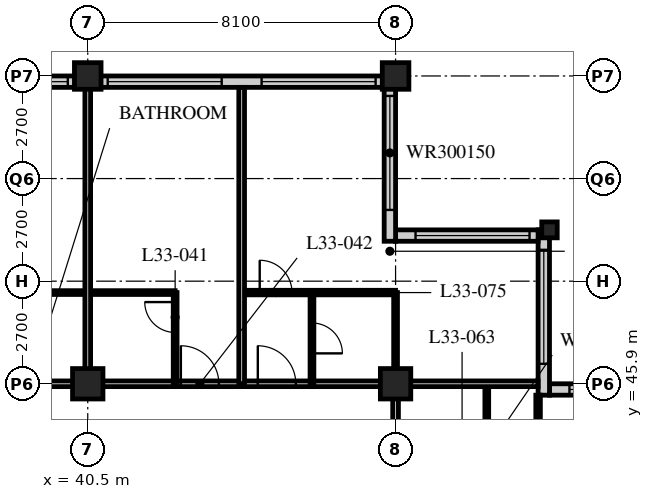
"""IFC4 building model, lengths in metres.
Left out: names, types, materials, properties, quantities, classifications, styles, units other than length and angle.
Written with IfcOpenShell. Run it as: python <this file> out.ifc"""

import sys

from ifc_helpers import new_model, si_unit, direction, frame, frame_2d, origin, origin_2d, place, context, subcontext, project, spatial, rectangle, hollow_rectangle, i_section, extrude, element, fill, save


model = new_model("IFC4")
c1 = context("Model", 3, precision=1e-05, world=origin(), true_north=direction((0.0, 1.0)))
c2 = subcontext(c1, "Body", "Model", "MODEL_VIEW")
j1 = project(units=[si_unit("LENGTHUNIT", "METRE"), si_unit("PLANEANGLEUNIT", "RADIAN")], contexts=[c1])
p1 = place(None, origin())
s1 = spatial("IfcSite", under=j1, at=p1, CompositionType="ELEMENT")
p2 = place(p1, origin())
s2 = spatial("IfcBuilding", under=s1, at=p2, CompositionType="ELEMENT")
p3 = place(p2, frame((0.0, 0.0, 130.6)))
s3 = spatial("IfcBuildingStorey", under=s2, at=p3, CompositionType="ELEMENT", Elevation=130.6)
p4 = place(p3, frame((40.5, 45.9, 0.0), z_axis=(0.0, 0.0, 1.0), x_axis=(1.0, 0.0, 0.0)))
e1 = element("IfcColumn", 1, at=p4, inside=s3, PredefinedType="COLUMN", context=c2, shape_type="SweptSolid", body=[
    extrude(hollow_rectangle(XDim=0.8, YDim=0.8, WallThickness=0.08, at=origin_2d()), origin(), (0.0, 0.0, 1.0), 3.4),
])
p5 = place(p3, frame((40.5, 54.0, 0.0), z_axis=(0.0, 0.0, 1.0), x_axis=(1.0, 0.0, 0.0)))
e2 = element("IfcColumn", 2, at=p5, inside=s3, PredefinedType="COLUMN", context=c2, shape_type="SweptSolid", body=[
    extrude(hollow_rectangle(XDim=0.7, YDim=0.7, WallThickness=0.07, at=origin_2d()), origin(), (0.0, 0.0, 1.0), 3.4),
])
p6 = place(p3, frame((48.6, 45.9, 0.0), z_axis=(0.0, 0.0, 1.0), x_axis=(1.0, 0.0, 0.0)))
e3 = element("IfcColumn", 3, at=p6, inside=s3, PredefinedType="COLUMN", context=c2, shape_type="SweptSolid", body=[
    extrude(hollow_rectangle(XDim=0.8, YDim=0.8, WallThickness=0.08, at=origin_2d()), origin(), (0.0, 0.0, 1.0), 3.4),
])
p7 = place(p3, frame((48.6, 54.0, 0.0), z_axis=(0.0, 0.0, 1.0), x_axis=(1.0, 0.0, 0.0)))
e4 = element("IfcColumn", 4, at=p7, inside=s3, PredefinedType="COLUMN", context=c2, shape_type="SweptSolid", body=[
    extrude(hollow_rectangle(XDim=0.7, YDim=0.7, WallThickness=0.07, at=origin_2d()), origin(), (0.0, 0.0, 1.0), 3.4),
])
p8 = place(p3, frame((52.65, 49.95, 0.0), z_axis=(0.0, 0.0, 1.0), x_axis=(1.0, 0.0, 0.0)))
e5 = element("IfcColumn", 5, at=p8, inside=s3, PredefinedType="COLUMN", context=c2, shape_type="SweptSolid", body=[
    extrude(i_section(OverallWidth=0.407, OverallDepth=0.419, WebThickness=0.031, FlangeThickness=0.049, FilletRadius=0.015, at=origin_2d()), origin(), (0.0, 0.0, 1.0), 3.4),
])
p9 = place(p3, frame((56.4, 45.75, 0.0), z_axis=(0.0, 0.0, 1.0), x_axis=(-1.0, 0.0, 0.0)))
e6 = element("IfcWall", 6, at=p9, inside=s3, PredefinedType="SOLIDWALL", context=c2, shape_type="SweptSolid", body=[
    extrude(rectangle(XDim=3.75, YDim=0.3, at=frame_2d((1.875, 0.0))), origin(), (0.0, 0.0, 1.0), 3.19),
])
p10 = place(p9, frame((0.225, 0.0, 0.9)))
e7 = element("IfcOpeningElement", 7, at=p10, cuts=e6, PredefinedType="OPENING", context=c2, shape_type="SweptSolid", body=[
    extrude(rectangle(XDim=3.0, YDim=1.5, at=frame_2d((1.5, 0.75))), frame((0.0, 0.16, 0.0), z_axis=(0.0, -1.0, 0.0), x_axis=(1.0, 0.0, 0.0)), (0.0, 0.0, 1.0), 0.32),
])
p11 = place(p3, frame((52.5, 45.6, 0.0), z_axis=(0.0, 0.0, 1.0), x_axis=(0.0, 1.0, 0.0)))
e8 = element("IfcWall", 8, at=p11, inside=s3, PredefinedType="SOLIDWALL", context=c2, shape_type="SweptSolid", body=[
    extrude(rectangle(XDim=4.35, YDim=0.3, at=frame_2d((2.175, 0.0))), origin(), (0.0, 0.0, 1.0), 3.19),
])
p12 = place(p11, frame((0.825, 0.0, 0.9)))
e9 = element("IfcOpeningElement", 9, at=p12, cuts=e8, PredefinedType="OPENING", context=c2, shape_type="SweptSolid", body=[
    extrude(rectangle(XDim=3.0, YDim=1.5, at=frame_2d((1.5, 0.75))), frame((0.0, 0.16, 0.0), z_axis=(0.0, -1.0, 0.0), x_axis=(1.0, 0.0, 0.0)), (0.0, 0.0, 1.0), 0.32),
])
p13 = place(p3, frame((52.35, 49.8, 0.0), z_axis=(0.0, 0.0, 1.0), x_axis=(-1.0, 0.0, 0.0)))
e10 = element("IfcWall", 10, at=p13, inside=s3, PredefinedType="SOLIDWALL", context=c2, shape_type="SweptSolid", body=[
    extrude(rectangle(XDim=3.75, YDim=0.3, at=frame_2d((1.875, 0.0))), origin(), (0.0, 0.0, 1.0), 3.19),
])
p14 = place(p13, frame((0.225, 0.0, 0.9)))
e11 = element("IfcOpeningElement", 11, at=p14, cuts=e10, PredefinedType="OPENING", context=c2, shape_type="SweptSolid", body=[
    extrude(rectangle(XDim=3.0, YDim=1.5, at=frame_2d((1.5, 0.75))), frame((0.0, 0.16, 0.0), z_axis=(0.0, -1.0, 0.0), x_axis=(1.0, 0.0, 0.0)), (0.0, 0.0, 1.0), 0.32),
])
p15 = place(p3, frame((48.45, 49.65, 0.0), z_axis=(0.0, 0.0, 1.0), x_axis=(0.0, 1.0, 0.0)))
e12 = element("IfcWall", 12, at=p15, inside=s3, PredefinedType="SOLIDWALL", context=c2, shape_type="SweptSolid", body=[
    extrude(rectangle(XDim=4.35, YDim=0.3, at=frame_2d((2.175, 0.0))), origin(), (0.0, 0.0, 1.0), 3.19),
])
p16 = place(p15, frame((0.825, 0.0, 0.9)))
e13 = element("IfcOpeningElement", 13, at=p16, cuts=e12, PredefinedType="OPENING", context=c2, shape_type="SweptSolid", body=[
    extrude(rectangle(XDim=3.0, YDim=1.5, at=frame_2d((1.5, 0.75))), frame((0.0, 0.16, 0.0), z_axis=(0.0, -1.0, 0.0), x_axis=(1.0, 0.0, 0.0)), (0.0, 0.0, 1.0), 0.32),
])
p17 = place(p3, frame((48.3, 53.85, 0.0), z_axis=(0.0, 0.0, 1.0), x_axis=(-1.0, 0.0, 0.0)))
e14 = element("IfcWall", 14, at=p17, inside=s3, PredefinedType="SOLIDWALL", context=c2, shape_type="SweptSolid", body=[
    extrude(rectangle(XDim=40.2, YDim=0.3, at=frame_2d((20.1, 0.0))), origin(), (0.0, 0.0, 1.0), 3.19),
])
p18 = place(p17, frame((0.225, 0.0, 0.9)))
e15 = element("IfcOpeningElement", 15, at=p18, cuts=e14, PredefinedType="OPENING", context=c2, shape_type="SweptSolid", body=[
    extrude(rectangle(XDim=3.0, YDim=2.0, at=frame_2d((1.5, 1.0))), frame((0.0, 0.16, 0.0), z_axis=(0.0, -1.0, 0.0), x_axis=(1.0, 0.0, 0.0)), (0.0, 0.0, 1.0), 0.32),
])
p19 = place(p17, frame((4.275, 0.0, 0.9)))
e16 = element("IfcOpeningElement", 16, at=p19, cuts=e14, PredefinedType="OPENING", context=c2, shape_type="SweptSolid", body=[
    extrude(rectangle(XDim=3.0, YDim=2.0, at=frame_2d((1.5, 1.0))), frame((0.0, 0.16, 0.0), z_axis=(0.0, -1.0, 0.0), x_axis=(1.0, 0.0, 0.0)), (0.0, 0.0, 1.0), 0.32),
])
p20 = place(p17, frame((8.325, 0.0, 0.9)))
e17 = element("IfcOpeningElement", 17, at=p20, cuts=e14, PredefinedType="OPENING", context=c2, shape_type="SweptSolid", body=[
    extrude(rectangle(XDim=3.0, YDim=2.0, at=frame_2d((1.5, 1.0))), frame((0.0, 0.16, 0.0), z_axis=(0.0, -1.0, 0.0), x_axis=(1.0, 0.0, 0.0)), (0.0, 0.0, 1.0), 0.32),
])
p21 = place(p17, frame((12.375, 0.0, 0.9)))
e18 = element("IfcOpeningElement", 18, at=p21, cuts=e14, PredefinedType="OPENING", context=c2, shape_type="SweptSolid", body=[
    extrude(rectangle(XDim=3.0, YDim=2.0, at=frame_2d((1.5, 1.0))), frame((0.0, 0.16, 0.0), z_axis=(0.0, -1.0, 0.0), x_axis=(1.0, 0.0, 0.0)), (0.0, 0.0, 1.0), 0.32),
])
p22 = place(p17, frame((16.425, 0.0, 0.9)))
e19 = element("IfcOpeningElement", 19, at=p22, cuts=e14, PredefinedType="OPENING", context=c2, shape_type="SweptSolid", body=[
    extrude(rectangle(XDim=3.0, YDim=2.0, at=frame_2d((1.5, 1.0))), frame((0.0, 0.16, 0.0), z_axis=(0.0, -1.0, 0.0), x_axis=(1.0, 0.0, 0.0)), (0.0, 0.0, 1.0), 0.32),
])
p23 = place(p17, frame((20.475, 0.0, 0.9)))
e20 = element("IfcOpeningElement", 20, at=p23, cuts=e14, PredefinedType="OPENING", context=c2, shape_type="SweptSolid", body=[
    extrude(rectangle(XDim=3.0, YDim=2.0, at=frame_2d((1.5, 1.0))), frame((0.0, 0.16, 0.0), z_axis=(0.0, -1.0, 0.0), x_axis=(1.0, 0.0, 0.0)), (0.0, 0.0, 1.0), 0.32),
])
p24 = place(p17, frame((24.525, 0.0, 0.9)))
e21 = element("IfcOpeningElement", 21, at=p24, cuts=e14, PredefinedType="OPENING", context=c2, shape_type="SweptSolid", body=[
    extrude(rectangle(XDim=3.0, YDim=2.0, at=frame_2d((1.5, 1.0))), frame((0.0, 0.16, 0.0), z_axis=(0.0, -1.0, 0.0), x_axis=(1.0, 0.0, 0.0)), (0.0, 0.0, 1.0), 0.32),
])
p25 = place(p17, frame((28.575, 0.0, 0.9)))
e22 = element("IfcOpeningElement", 22, at=p25, cuts=e14, PredefinedType="OPENING", context=c2, shape_type="SweptSolid", body=[
    extrude(rectangle(XDim=3.0, YDim=2.0, at=frame_2d((1.5, 1.0))), frame((0.0, 0.16, 0.0), z_axis=(0.0, -1.0, 0.0), x_axis=(1.0, 0.0, 0.0)), (0.0, 0.0, 1.0), 0.32),
])
p26 = place(p17, frame((32.625, 0.0, 0.9)))
e23 = element("IfcOpeningElement", 23, at=p26, cuts=e14, PredefinedType="OPENING", context=c2, shape_type="SweptSolid", body=[
    extrude(rectangle(XDim=3.0, YDim=2.0, at=frame_2d((1.5, 1.0))), frame((0.0, 0.16, 0.0), z_axis=(0.0, -1.0, 0.0), x_axis=(1.0, 0.0, 0.0)), (0.0, 0.0, 1.0), 0.32),
])
p27 = place(p17, frame((36.675, 0.0, 0.9)))
e24 = element("IfcOpeningElement", 24, at=p27, cuts=e14, PredefinedType="OPENING", context=c2, shape_type="SweptSolid", body=[
    extrude(rectangle(XDim=3.0, YDim=2.0, at=frame_2d((1.5, 1.0))), frame((0.0, 0.16, 0.0), z_axis=(0.0, -1.0, 0.0), x_axis=(1.0, 0.0, 0.0)), (0.0, 0.0, 1.0), 0.32),
])
p28 = place(p3, frame((8.1, 45.9, 0.0), z_axis=(0.0, 0.0, 1.0), x_axis=(1.0, 0.0, 0.0)))
e25 = element("IfcWall", 25, at=p28, inside=s3, PredefinedType="PARTITIONING", context=c2, shape_type="SweptSolid", body=[
    extrude(rectangle(XDim=40.5, YDim=0.15, at=frame_2d((20.25, 0.0))), origin(), (0.0, 0.0, 1.0), 2.578),
])
p29 = place(p28, frame((9.625, 0.0, 0.0)))
e26 = element("IfcOpeningElement", 26, at=p29, cuts=e25, PredefinedType="OPENING", context=c2, shape_type="SweptSolid", body=[
    extrude(rectangle(XDim=1.0, YDim=2.1, at=frame_2d((0.5, 1.05))), frame((0.0, 0.085, 0.0), z_axis=(0.0, -1.0, 0.0), x_axis=(1.0, 0.0, 0.0)), (0.0, 0.0, 1.0), 0.17),
])
p30 = place(p28, frame((21.65, 0.0, 0.0)))
e27 = element("IfcOpeningElement", 27, at=p30, cuts=e25, PredefinedType="OPENING", context=c2, shape_type="SweptSolid", body=[
    extrude(rectangle(XDim=1.0, YDim=2.1, at=frame_2d((0.5, 1.05))), frame((0.0, 0.085, 0.0), z_axis=(0.0, -1.0, 0.0), x_axis=(1.0, 0.0, 0.0)), (0.0, 0.0, 1.0), 0.17),
])
p31 = place(p28, frame((26.75, 0.0, 0.0)))
e28 = element("IfcOpeningElement", 28, at=p31, cuts=e25, PredefinedType="OPENING", context=c2, shape_type="SweptSolid", body=[
    extrude(rectangle(XDim=1.0, YDim=2.1, at=frame_2d((0.5, 1.05))), frame((0.0, 0.085, 0.0), z_axis=(0.0, -1.0, 0.0), x_axis=(1.0, 0.0, 0.0)), (0.0, 0.0, 1.0), 0.17),
])
p32 = place(p28, frame((28.95, 0.0, 0.0)))
e29 = element("IfcOpeningElement", 29, at=p32, cuts=e25, PredefinedType="OPENING", context=c2, shape_type="SweptSolid", body=[
    extrude(rectangle(XDim=1.0, YDim=2.1, at=frame_2d((0.5, 1.05))), frame((0.0, 0.085, 0.0), z_axis=(0.0, -1.0, 0.0), x_axis=(1.0, 0.0, 0.0)), (0.0, 0.0, 1.0), 0.17),
])
p33 = place(p28, frame((34.85, 0.0, 0.0)))
e30 = element("IfcOpeningElement", 30, at=p33, cuts=e25, PredefinedType="OPENING", context=c2, shape_type="SweptSolid", body=[
    extrude(rectangle(XDim=1.0, YDim=2.1, at=frame_2d((0.5, 1.05))), frame((0.0, 0.085, 0.0), z_axis=(0.0, -1.0, 0.0), x_axis=(1.0, 0.0, 0.0)), (0.0, 0.0, 1.0), 0.17),
])
p34 = place(p28, frame((36.875, 0.0, 0.0)))
e31 = element("IfcOpeningElement", 31, at=p34, cuts=e25, PredefinedType="OPENING", context=c2, shape_type="SweptSolid", body=[
    extrude(rectangle(XDim=1.0, YDim=2.1, at=frame_2d((0.5, 1.05))), frame((0.0, 0.085, 0.0), z_axis=(0.0, -1.0, 0.0), x_axis=(1.0, 0.0, 0.0)), (0.0, 0.0, 1.0), 0.17),
])
p35 = place(p28, frame((2.625, 0.0, 0.0)))
e32 = element("IfcOpeningElement", 32, at=p35, cuts=e25, PredefinedType="OPENING", context=c2, shape_type="SweptSolid", body=[
    extrude(rectangle(XDim=1.0, YDim=2.1, at=frame_2d((0.5, 1.05))), frame((0.0, 0.085, 0.0), z_axis=(0.0, -1.0, 0.0), x_axis=(1.0, 0.0, 0.0)), (0.0, 0.0, 1.0), 0.17),
])
p36 = place(p3, frame((48.6, 21.6, 0.0), z_axis=(0.0, 0.0, 1.0), x_axis=(0.0, 1.0, 0.0)))
e33 = element("IfcWall", 33, at=p36, inside=s3, PredefinedType="PARTITIONING", context=c2, shape_type="SweptSolid", body=[
    extrude(rectangle(XDim=24.3, YDim=0.15, at=frame_2d((12.15, 0.0))), origin(), (0.0, 0.0, 1.0), 2.578),
])
p37 = place(p36, frame((2.75, 0.0, 0.0)))
e34 = element("IfcOpeningElement", 34, at=p37, cuts=e33, PredefinedType="OPENING", context=c2, shape_type="SweptSolid", body=[
    extrude(rectangle(XDim=1.0, YDim=2.1, at=frame_2d((0.5, 1.05))), frame((0.0, 0.085, 0.0), z_axis=(0.0, -1.0, 0.0), x_axis=(1.0, 0.0, 0.0)), (0.0, 0.0, 1.0), 0.17),
])
p38 = place(p36, frame((4.65, 0.0, 0.0)))
e35 = element("IfcOpeningElement", 35, at=p38, cuts=e33, PredefinedType="OPENING", context=c2, shape_type="SweptSolid", body=[
    extrude(rectangle(XDim=1.0, YDim=2.1, at=frame_2d((0.5, 1.05))), frame((0.0, 0.085, 0.0), z_axis=(0.0, -1.0, 0.0), x_axis=(1.0, 0.0, 0.0)), (0.0, 0.0, 1.0), 0.17),
])
p39 = place(p36, frame((10.0, 0.0, 0.0)))
e36 = element("IfcOpeningElement", 36, at=p39, cuts=e33, PredefinedType="OPENING", context=c2, shape_type="SweptSolid", body=[
    extrude(rectangle(XDim=1.0, YDim=2.1, at=frame_2d((0.5, 1.05))), frame((0.0, 0.085, 0.0), z_axis=(0.0, -1.0, 0.0), x_axis=(1.0, 0.0, 0.0)), (0.0, 0.0, 1.0), 0.17),
])
p40 = place(p36, frame((18.1, 0.0, 0.0)))
e37 = element("IfcOpeningElement", 37, at=p40, cuts=e33, PredefinedType="OPENING", context=c2, shape_type="SweptSolid", body=[
    extrude(rectangle(XDim=1.0, YDim=2.1, at=frame_2d((0.5, 1.05))), frame((0.0, 0.085, 0.0), z_axis=(0.0, -1.0, 0.0), x_axis=(1.0, 0.0, 0.0)), (0.0, 0.0, 1.0), 0.17),
])
p41 = place(p3, frame((38.2, 48.3, 0.0), z_axis=(0.0, 0.0, 1.0), x_axis=(1.0, 0.0, 0.0)))
e38 = element("IfcWall", 38, at=p41, inside=s3, PredefinedType="PARTITIONING", context=c2, shape_type="SweptSolid", body=[
    extrude(rectangle(XDim=4.6, YDim=0.1, at=frame_2d((2.3, 0.0))), origin(), (0.0, 0.0, 1.0), 3.19),
])
p42 = place(p3, frame((40.5, 45.9, 0.0), z_axis=(0.0, 0.0, 1.0), x_axis=(0.0, 1.0, 0.0)))
e39 = element("IfcWall", 39, at=p42, inside=s3, PredefinedType="PARTITIONING", context=c2, shape_type="SweptSolid", body=[
    extrude(rectangle(XDim=7.8, YDim=0.15, at=frame_2d((3.9, 0.0))), origin(), (0.0, 0.0, 1.0), 2.578),
])
p43 = place(p3, frame((42.8, 45.9, 0.0), z_axis=(0.0, 0.0, 1.0), x_axis=(0.0, 1.0, 0.0)))
e40 = element("IfcWall", 40, at=p43, inside=s3, PredefinedType="PARTITIONING", context=c2, shape_type="SweptSolid", body=[
    extrude(rectangle(XDim=2.4, YDim=0.1, at=frame_2d((1.2, 0.0))), origin(), (0.0, 0.0, 1.0), 3.19),
])
p44 = place(p43, frame((1.35, 0.0, 0.0)))
e41 = element("IfcOpeningElement", 41, at=p44, cuts=e40, PredefinedType="OPENING", context=c2, shape_type="SweptSolid", body=[
    extrude(rectangle(XDim=0.8, YDim=2.1, at=frame_2d((0.4, 1.05))), frame((0.0, 0.06, 0.0), z_axis=(0.0, -1.0, 0.0), x_axis=(1.0, 0.0, 0.0)), (0.0, 0.0, 1.0), 0.12),
])
p45 = place(p3, frame((51.0, 43.3, 0.0), z_axis=(0.0, 0.0, 1.0), x_axis=(0.0, 1.0, 0.0)))
e42 = element("IfcWall", 42, at=p45, inside=s3, PredefinedType="PARTITIONING", context=c2, shape_type="SweptSolid", body=[
    extrude(rectangle(XDim=2.6, YDim=0.1, at=frame_2d((1.3, 0.0))), origin(), (0.0, 0.0, 1.0), 3.19),
])
p46 = place(p3, frame((44.55, 48.3, 0.0), z_axis=(0.0, 0.0, 1.0), x_axis=(1.0, 0.0, 0.0)))
e43 = element("IfcWall", 43, at=p46, inside=s3, PredefinedType="PARTITIONING", context=c2, shape_type="SweptSolid", body=[
    extrude(rectangle(XDim=4.05, YDim=0.12, at=frame_2d((2.025, 0.0))), origin(), (0.0, 0.0, 1.0), 3.19),
])
p47 = place(p46, frame((0.475, 0.0, 0.0)))
e44 = element("IfcOpeningElement", 44, at=p47, cuts=e43, PredefinedType="OPENING", context=c2, shape_type="SweptSolid", body=[
    extrude(rectangle(XDim=0.85, YDim=2.1, at=frame_2d((0.425, 1.05))), frame((0.0, 0.07, 0.0), z_axis=(0.0, -1.0, 0.0), x_axis=(1.0, 0.0, 0.0)), (0.0, 0.0, 1.0), 0.14),
])
p48 = place(p3, frame((46.4, 45.9, 0.0), z_axis=(0.0, 0.0, 1.0), x_axis=(0.0, 1.0, 0.0)))
e45 = element("IfcWall", 45, at=p48, inside=s3, PredefinedType="PARTITIONING", context=c2, shape_type="SweptSolid", body=[
    extrude(rectangle(XDim=2.4, YDim=0.1, at=frame_2d((1.2, 0.0))), origin(), (0.0, 0.0, 1.0), 3.19),
])
p49 = place(p48, frame((0.8, 0.0, 0.0)))
e46 = element("IfcOpeningElement", 46, at=p49, cuts=e45, PredefinedType="OPENING", context=c2, shape_type="SweptSolid", body=[
    extrude(rectangle(XDim=0.8, YDim=2.1, at=frame_2d((0.4, 1.05))), frame((0.0, 0.06, 0.0), z_axis=(0.0, -1.0, 0.0), x_axis=(1.0, 0.0, 0.0)), (0.0, 0.0, 1.0), 0.12),
])
p50 = place(p3, frame((48.6, 45.9, 0.0), z_axis=(0.0, 0.0, 1.0), x_axis=(0.0, 1.0, 0.0)))
e47 = element("IfcWall", 47, at=p50, inside=s3, PredefinedType="PARTITIONING", context=c2, shape_type="SweptSolid", body=[
    extrude(rectangle(XDim=2.4, YDim=0.1, at=frame_2d((1.2, 0.0))), origin(), (0.0, 0.0, 1.0), 2.578),
])
p51 = place(p3, frame((48.6, 45.9, 0.0), z_axis=(0.0, 0.0, 1.0), x_axis=(1.0, 0.0, 0.0)))
e48 = element("IfcWall", 48, at=p51, inside=s3, PredefinedType="PARTITIONING", context=c2, shape_type="SweptSolid", body=[
    extrude(rectangle(XDim=3.75, YDim=0.15, at=frame_2d((1.875, 0.0))), origin(), (0.0, 0.0, 1.0), 2.578),
])
p52 = place(p3, frame((44.55, 45.9, 0.0), z_axis=(0.0, 0.0, 1.0), x_axis=(0.0, 1.0, 0.0)))
e49 = element("IfcWall", 49, at=p52, inside=s3, PredefinedType="PARTITIONING", context=c2, shape_type="SweptSolid", body=[
    extrude(rectangle(XDim=7.8, YDim=0.15, at=frame_2d((3.9, 0.0))), origin(), (0.0, 0.0, 1.0), 3.19),
])
p53 = place(p3, frame((52.35, 45.6, 0.0), z_axis=(0.0, 0.0, 1.0), x_axis=(0.0, -1.0, 0.0)))
e50 = element("IfcWall", 50, at=p53, inside=s3, PredefinedType="PARTITIONING", context=c2, shape_type="SweptSolid", body=[
    extrude(rectangle(XDim=3.75, YDim=0.12, at=frame_2d((1.875, 0.0))), origin(), (0.0, 0.0, 1.0), 3.19),
])
p54 = place(p53, frame((2.625, 0.0, 0.0)))
e51 = element("IfcOpeningElement", 51, at=p54, cuts=e50, PredefinedType="OPENING", context=c2, shape_type="SweptSolid", body=[
    extrude(rectangle(XDim=0.85, YDim=2.1, at=frame_2d((0.425, 1.05))), frame((0.0, 0.07, 0.0), z_axis=(0.0, -1.0, 0.0), x_axis=(1.0, 0.0, 0.0)), (0.0, 0.0, 1.0), 0.14),
])
p55 = place(p10, origin())
e52 = element("IfcWindow", 52, at=p55, inside=s3, PartitioningType="SINGLE_PANEL", PredefinedType="WINDOW", context=c2, shape_type="SweptSolid", body=[
    extrude(rectangle(XDim=3.0, YDim=1.5, at=frame_2d((1.5, 0.75))), frame((0.0, 0.03, 0.0), z_axis=(0.0, -1.0, 0.0), x_axis=(1.0, 0.0, 0.0)), (0.0, 0.0, 1.0), 0.06),
])
fill(e7, e52)
p56 = place(p12, origin())
e53 = element("IfcWindow", 53, at=p56, inside=s3, PartitioningType="SINGLE_PANEL", PredefinedType="WINDOW", context=c2, shape_type="SweptSolid", body=[
    extrude(rectangle(XDim=3.0, YDim=1.5, at=frame_2d((1.5, 0.75))), frame((0.0, 0.03, 0.0), z_axis=(0.0, -1.0, 0.0), x_axis=(1.0, 0.0, 0.0)), (0.0, 0.0, 1.0), 0.06),
])
fill(e9, e53)
p57 = place(p14, origin())
e54 = element("IfcWindow", 54, at=p57, inside=s3, PartitioningType="SINGLE_PANEL", PredefinedType="WINDOW", context=c2, shape_type="SweptSolid", body=[
    extrude(rectangle(XDim=3.0, YDim=1.5, at=frame_2d((1.5, 0.75))), frame((0.0, 0.03, 0.0), z_axis=(0.0, -1.0, 0.0), x_axis=(1.0, 0.0, 0.0)), (0.0, 0.0, 1.0), 0.06),
])
fill(e11, e54)
p58 = place(p16, origin())
e55 = element("IfcWindow", 55, at=p58, inside=s3, PartitioningType="SINGLE_PANEL", PredefinedType="WINDOW", context=c2, shape_type="SweptSolid", body=[
    extrude(rectangle(XDim=3.0, YDim=1.5, at=frame_2d((1.5, 0.75))), frame((0.0, 0.03, 0.0), z_axis=(0.0, -1.0, 0.0), x_axis=(1.0, 0.0, 0.0)), (0.0, 0.0, 1.0), 0.06),
])
fill(e13, e55)
p59 = place(p18, origin())
e56 = element("IfcWindow", 56, at=p59, inside=s3, PartitioningType="SINGLE_PANEL", PredefinedType="WINDOW", context=c2, shape_type="SweptSolid", body=[
    extrude(rectangle(XDim=3.0, YDim=2.0, at=frame_2d((1.5, 1.0))), frame((0.0, 0.03, 0.0), z_axis=(0.0, -1.0, 0.0), x_axis=(1.0, 0.0, 0.0)), (0.0, 0.0, 1.0), 0.06),
])
fill(e15, e56)
p60 = place(p19, origin())
e57 = element("IfcWindow", 57, at=p60, inside=s3, PartitioningType="SINGLE_PANEL", PredefinedType="WINDOW", context=c2, shape_type="SweptSolid", body=[
    extrude(rectangle(XDim=3.0, YDim=2.0, at=frame_2d((1.5, 1.0))), frame((0.0, 0.03, 0.0), z_axis=(0.0, -1.0, 0.0), x_axis=(1.0, 0.0, 0.0)), (0.0, 0.0, 1.0), 0.06),
])
fill(e16, e57)
p61 = place(p20, origin())
e58 = element("IfcWindow", 58, at=p61, inside=s3, PartitioningType="SINGLE_PANEL", PredefinedType="WINDOW", context=c2, shape_type="SweptSolid", body=[
    extrude(rectangle(XDim=3.0, YDim=2.0, at=frame_2d((1.5, 1.0))), frame((0.0, 0.03, 0.0), z_axis=(0.0, -1.0, 0.0), x_axis=(1.0, 0.0, 0.0)), (0.0, 0.0, 1.0), 0.06),
])
fill(e17, e58)
p62 = place(p44, origin())
e59 = element("IfcDoor", 59, at=p62, inside=s3, OperationType="SINGLE_SWING_RIGHT", PredefinedType="DOOR", context=c2, shape_type="SweptSolid", body=[
    extrude(rectangle(XDim=0.8, YDim=2.1, at=frame_2d((0.4, 1.05))), frame((0.0, 0.025, 0.0), z_axis=(0.0, -1.0, 0.0), x_axis=(1.0, 0.0, 0.0)), (0.0, 0.0, 1.0), 0.05),
])
fill(e41, e59)
p63 = place(p33, origin())
e60 = element("IfcDoor", 60, at=p63, inside=s3, OperationType="SINGLE_SWING_LEFT", PredefinedType="DOOR", context=c2, shape_type="SweptSolid", body=[
    extrude(rectangle(XDim=1.0, YDim=2.1, at=frame_2d((0.5, 1.05))), frame((0.0, 0.025, 0.0), z_axis=(0.0, -1.0, 0.0), x_axis=(1.0, 0.0, 0.0)), (0.0, 0.0, 1.0), 0.05),
])
fill(e30, e60)
p64 = place(p49, origin())
e61 = element("IfcDoor", 61, at=p64, inside=s3, OperationType="SINGLE_SWING_RIGHT", PredefinedType="DOOR", context=c2, shape_type="SweptSolid", body=[
    extrude(rectangle(XDim=0.8, YDim=2.1, at=frame_2d((0.4, 1.05))), frame((0.0, 0.025, 0.0), z_axis=(0.0, -1.0, 0.0), x_axis=(1.0, 0.0, 0.0)), (0.0, 0.0, 1.0), 0.05),
])
fill(e46, e61)
p65 = place(p34, origin())
e62 = element("IfcDoor", 62, at=p65, inside=s3, OperationType="SINGLE_SWING_LEFT", PredefinedType="DOOR", context=c2, shape_type="SweptSolid", body=[
    extrude(rectangle(XDim=1.0, YDim=2.1, at=frame_2d((0.5, 1.05))), frame((0.0, 0.025, 0.0), z_axis=(0.0, -1.0, 0.0), x_axis=(1.0, 0.0, 0.0)), (0.0, 0.0, 1.0), 0.05),
])
fill(e31, e62)
p66 = place(p47, origin())
e63 = element("IfcDoor", 63, at=p66, inside=s3, OperationType="SINGLE_SWING_LEFT", PredefinedType="DOOR", context=c2, shape_type="SweptSolid", body=[
    extrude(rectangle(XDim=0.85, YDim=2.1, at=frame_2d((0.425, 1.05))), frame((0.0, 0.025, 0.0), z_axis=(0.0, -1.0, 0.0), x_axis=(1.0, 0.0, 0.0)), (0.0, 0.0, 1.0), 0.05),
])
fill(e44, e63)
save(model, sys.argv[1])
